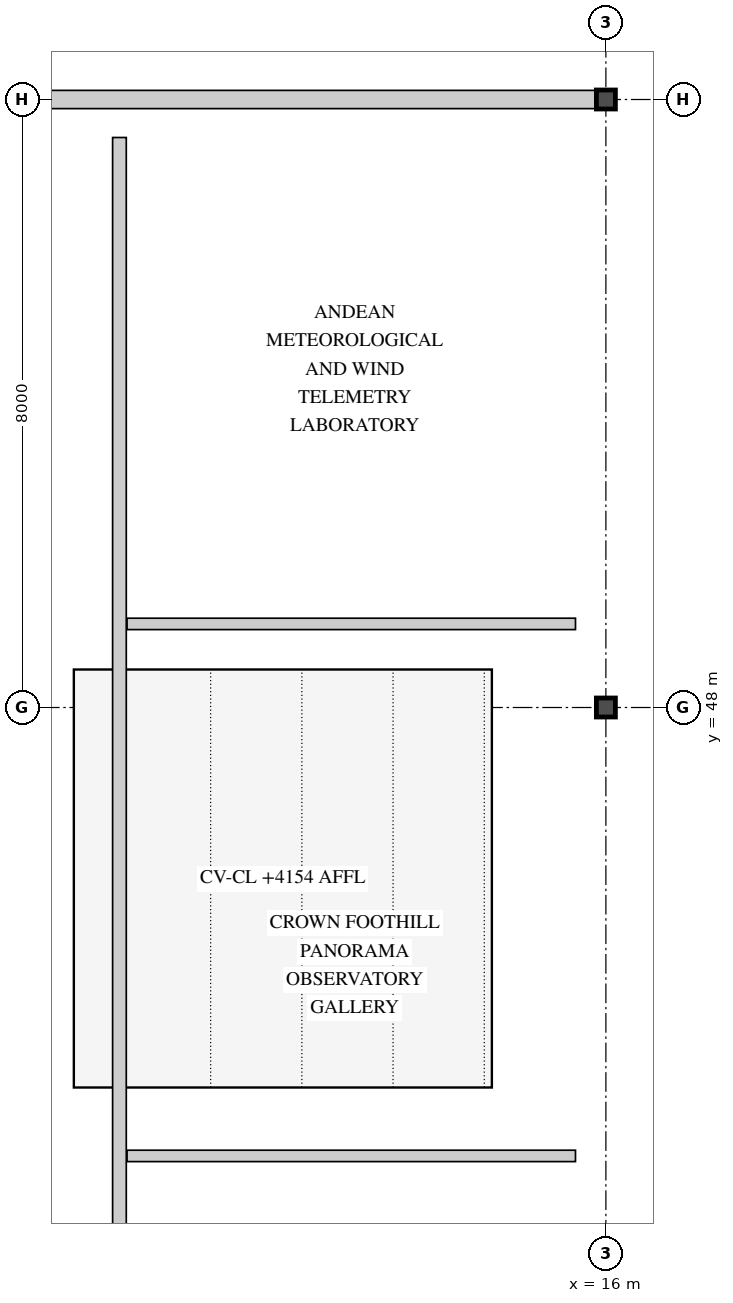
"""IFC4 building model, lengths in metres.
Left out: names, types, materials, properties, quantities, classifications, styles, units other than length and angle.
Written with IfcOpenShell. Run it as: python <this file> out.ifc"""

import sys

from ifc_helpers import new_model, si_unit, direction, frame, frame_2d, origin, origin_2d, place, context, subcontext, project, spatial, rectangle, hollow_rectangle, extrude, element, fill, save


model = new_model("IFC4")
c1 = context("Model", 3, precision=1e-05, world=origin(), true_north=direction((0.0, 1.0)))
c2 = subcontext(c1, "Body", "Model", "MODEL_VIEW")
j1 = project(units=[si_unit("LENGTHUNIT", "METRE"), si_unit("PLANEANGLEUNIT", "RADIAN")], contexts=[c1])
p1 = place(None, origin())
s1 = spatial("IfcSite", under=j1, at=p1, CompositionType="ELEMENT")
p2 = place(p1, origin())
s2 = spatial("IfcBuilding", under=s1, at=p2, CompositionType="ELEMENT")
p3 = place(p2, frame((0.0, 0.0, 19.8)))
s3 = spatial("IfcBuildingStorey", under=s2, at=p3, CompositionType="ELEMENT", Elevation=19.8)
for number, where, z_axis, x_axis in (
    (1, (16.0, 48.0, 0.0), (0.0, 0.0, 1.0), (1.0, 0.0, 0.0)),
    (2, (16.0, 56.0, 0.0), (0.0, 0.0, 1.0), (1.0, 0.0, 0.0)),
):
    element("IfcColumn", number, at=place(p3, frame(where, z_axis=z_axis, x_axis=x_axis)), inside=s3, PredefinedType="COLUMN", context=c2, shape_type="SweptSolid", body=[
        extrude(hollow_rectangle(XDim=0.25, YDim=0.25, WallThickness=0.012, at=origin_2d()), origin(), (0.0, 0.0, 1.0), 4.5),
    ])
p4 = place(p3, frame((0.125, 56.0, 0.0), z_axis=(0.0, 0.0, 1.0), x_axis=(1.0, 0.0, 0.0)))
e3 = element("IfcWall", 3, at=p4, inside=s3, PredefinedType="STANDARD", context=c2, shape_type="SweptSolid", body=[
    extrude(rectangle(XDim=15.75, YDim=0.24, at=frame_2d((7.875, 0.0))), origin(), (0.0, 0.0, 1.0), 4.2),
])
p5 = place(p4, frame((9.812, 0.0, 0.8)))
e4 = element("IfcOpeningElement", 4, at=p5, cuts=e3, PredefinedType="OPENING", context=c2, shape_type="SweptSolid", body=[
    extrude(rectangle(XDim=0.85, YDim=2.4, at=frame_2d((0.425, 1.2))), frame((0.0, 0.13, 0.0), z_axis=(0.0, -1.0, 0.0), x_axis=(1.0, 0.0, 0.0)), (0.0, 0.0, 1.0), 0.26),
])
p6 = place(p4, frame((12.49, 0.0, 0.8)))
e5 = element("IfcOpeningElement", 5, at=p6, cuts=e3, PredefinedType="OPENING", context=c2, shape_type="SweptSolid", body=[
    extrude(rectangle(XDim=0.85, YDim=2.4, at=frame_2d((0.425, 1.2))), frame((0.0, 0.13, 0.0), z_axis=(0.0, -1.0, 0.0), x_axis=(1.0, 0.0, 0.0)), (0.0, 0.0, 1.0), 0.26),
])
p7 = place(p4, frame((3.2, 0.0, 0.0)))
e6 = element("IfcOpeningElement", 6, at=p7, cuts=e3, PredefinedType="OPENING", context=c2, shape_type="SweptSolid", body=[
    extrude(rectangle(XDim=1.6, YDim=2.4, at=frame_2d((0.8, 1.2))), frame((0.0, 0.13, 0.0), z_axis=(0.0, -1.0, 0.0), x_axis=(1.0, 0.0, 0.0)), (0.0, 0.0, 1.0), 0.26),
])
p8 = place(p3, frame((9.6, 32.4, 0.0), z_axis=(0.0, 0.0, 1.0), x_axis=(0.0, 1.0, 0.0)))
e7 = element("IfcWall", 7, at=p8, inside=s3, PredefinedType="PARTITIONING", context=c2, shape_type="SweptSolid", body=[
    extrude(rectangle(XDim=23.1, YDim=0.18, at=frame_2d((11.55, 0.0))), origin(), (0.0, 0.0, 1.0), 4.18),
])
p9 = place(p8, frame((1.2, 0.0, 0.0)))
e8 = element("IfcOpeningElement", 8, at=p9, cuts=e7, PredefinedType="OPENING", context=c2, shape_type="SweptSolid", body=[
    extrude(rectangle(XDim=0.95, YDim=2.15, at=frame_2d((0.475, 1.075))), frame((0.0, 0.1, 0.0), z_axis=(0.0, -1.0, 0.0), x_axis=(1.0, 0.0, 0.0)), (0.0, 0.0, 1.0), 0.2),
])
p10 = place(p8, frame((6.2, 0.0, 0.0)))
e9 = element("IfcOpeningElement", 9, at=p10, cuts=e7, PredefinedType="OPENING", context=c2, shape_type="SweptSolid", body=[
    extrude(rectangle(XDim=1.6, YDim=2.3, at=frame_2d((0.8, 1.15))), frame((0.0, 0.1, 0.0), z_axis=(0.0, -1.0, 0.0), x_axis=(1.0, 0.0, 0.0)), (0.0, 0.0, 1.0), 0.2),
])
p11 = place(p8, frame((12.8, 0.0, 0.0)))
e10 = element("IfcOpeningElement", 10, at=p11, cuts=e7, PredefinedType="OPENING", context=c2, shape_type="SweptSolid", body=[
    extrude(rectangle(XDim=1.6, YDim=2.3, at=frame_2d((0.8, 1.15))), frame((0.0, 0.1, 0.0), z_axis=(0.0, -1.0, 0.0), x_axis=(1.0, 0.0, 0.0)), (0.0, 0.0, 1.0), 0.2),
])
p12 = place(p8, frame((19.2, 0.0, 0.0)))
e11 = element("IfcOpeningElement", 11, at=p12, cuts=e7, PredefinedType="OPENING", context=c2, shape_type="SweptSolid", body=[
    extrude(rectangle(XDim=1.0, YDim=2.2, at=frame_2d((0.5, 1.1))), frame((0.0, 0.1, 0.0), z_axis=(0.0, -1.0, 0.0), x_axis=(1.0, 0.0, 0.0)), (0.0, 0.0, 1.0), 0.2),
])
for number, where, z_axis, x_axis in (
    (12, (9.7, 49.1, 0.0), (0.0, 0.0, 1.0), (1.0, 0.0, 0.0)),
    (13, (9.7, 42.1, 0.0), (0.0, 0.0, 1.0), (1.0, 0.0, 0.0)),
):
    element("IfcWall", number, at=place(p3, frame(where, z_axis=z_axis, x_axis=x_axis)), inside=s3, PredefinedType="PARTITIONING", context=c2, shape_type="SweptSolid", body=[
        extrude(rectangle(XDim=5.9, YDim=0.15, at=frame_2d((2.95, 0.0))), origin(), (0.0, 0.0, 1.0), 4.18),
    ])
p13 = place(p5, origin())
e14 = element("IfcWindow", 14, at=p13, inside=s3, PartitioningType="SINGLE_PANEL", PredefinedType="WINDOW", context=c2, shape_type="SweptSolid", body=[
    extrude(rectangle(XDim=0.85, YDim=2.4, at=frame_2d((0.425, 1.2))), frame((0.0, 0.03, 0.0), z_axis=(0.0, -1.0, 0.0), x_axis=(1.0, 0.0, 0.0)), (0.0, 0.0, 1.0), 0.06),
])
fill(e4, e14)
p14 = place(p6, origin())
e15 = element("IfcWindow", 15, at=p14, inside=s3, PartitioningType="SINGLE_PANEL", PredefinedType="WINDOW", context=c2, shape_type="SweptSolid", body=[
    extrude(rectangle(XDim=0.85, YDim=2.4, at=frame_2d((0.425, 1.2))), frame((0.0, 0.03, 0.0), z_axis=(0.0, -1.0, 0.0), x_axis=(1.0, 0.0, 0.0)), (0.0, 0.0, 1.0), 0.06),
])
fill(e5, e15)
p15 = place(p11, origin())
e16 = element("IfcDoor", 16, at=p15, inside=s3, OperationType="DOUBLE_DOOR_SINGLE_SWING", PredefinedType="DOOR", context=c2, shape_type="SweptSolid", body=[
    extrude(rectangle(XDim=1.6, YDim=2.3, at=frame_2d((0.8, 1.15))), frame((0.0, 0.025, 0.0), z_axis=(0.0, -1.0, 0.0), x_axis=(1.0, 0.0, 0.0)), (0.0, 0.0, 1.0), 0.05),
])
fill(e10, e16)
p16 = place(p12, origin())
e17 = element("IfcDoor", 17, at=p16, inside=s3, OperationType="SINGLE_SWING_RIGHT", PredefinedType="DOOR", context=c2, shape_type="SweptSolid", body=[
    extrude(rectangle(XDim=1.0, YDim=2.2, at=frame_2d((0.5, 1.1))), frame((0.0, 0.025, 0.0), z_axis=(0.0, -1.0, 0.0), x_axis=(1.0, 0.0, 0.0)), (0.0, 0.0, 1.0), 0.05),
])
fill(e11, e17)
save(model, sys.argv[1])
